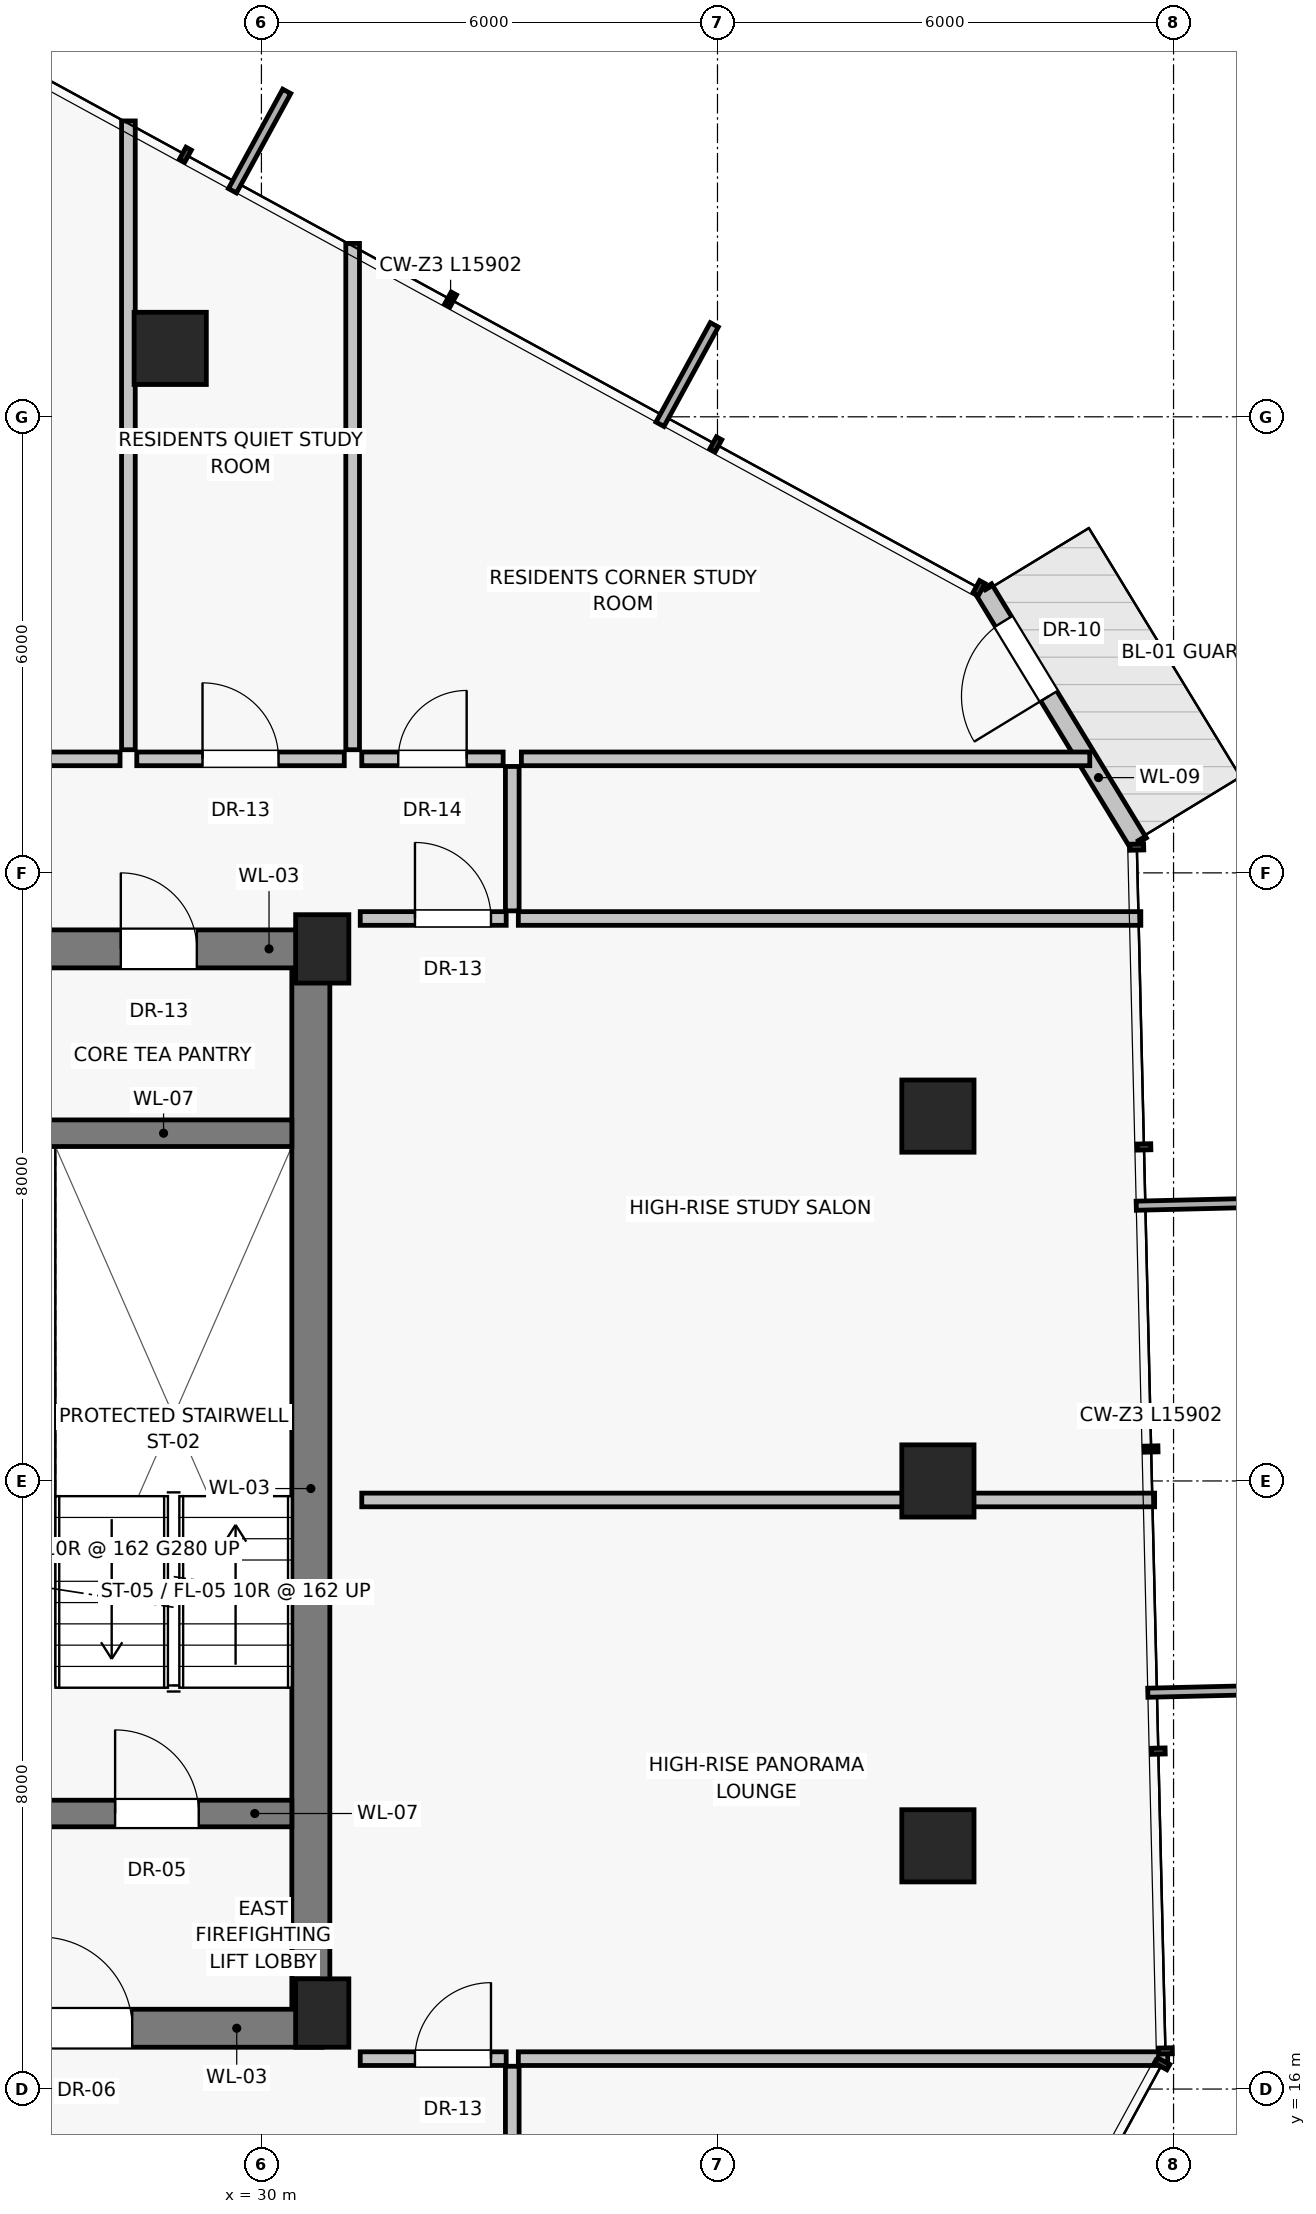
"""IFC4 building model, lengths in metres.
Left out: names, types, materials, properties, quantities, classifications, styles, units other than length and angle.
Written with IfcOpenShell. Run it as: python <this file> out.ifc"""

import sys

from ifc_helpers import new_model, si_unit, direction, frame, frame_2d, origin, origin_2d, place, context, subcontext, project, spatial, rectangle, extrude, source, transform, mapped, element, fill, save


model = new_model("IFC4")
c1 = context("Model", 3, precision=1e-05, world=origin(), true_north=direction((0.0, 1.0)))
c2 = subcontext(c1, "Body", "Model", "MODEL_VIEW")
j1 = project(units=[si_unit("LENGTHUNIT", "METRE"), si_unit("PLANEANGLEUNIT", "RADIAN")], contexts=[c1])
p1 = place(None, origin())
s1 = spatial("IfcSite", under=j1, at=p1, CompositionType="ELEMENT")
p2 = place(p1, origin())
s2 = spatial("IfcBuilding", under=s1, at=p2, CompositionType="ELEMENT")
p3 = place(p2, frame((0.0, 0.0, 201.6)))
s3 = spatial("IfcBuildingStorey", under=s2, at=p3, CompositionType="ELEMENT", Elevation=201.6)
for number, where, z_axis, x_axis in (
    (1, (30.8, 17.0, 0.0), (0.0, 0.0, 1.0), (1.0, 0.0, 0.0)),
    (2, (30.8, 31.0, 0.0), (0.0, 0.0, 1.0), (1.0, 0.0, 0.0)),
):
    element("IfcColumn", number, at=place(p3, frame(where, z_axis=z_axis, x_axis=x_axis)), inside=s3, PredefinedType="PILASTER", context=c2, shape_type="SweptSolid", body=[
        extrude(rectangle(XDim=0.7, YDim=0.9, at=origin_2d()), origin(), (0.0, 0.0, 1.0), 3.25),
    ])
for number, where, z_axis, x_axis in (
    (3, (38.9, 19.2, 0.0), (0.0, 0.0, 1.0), (1.0, 0.0, 0.0)),
    (4, (38.9, 24.0, 0.0), (0.0, 0.0, 1.0), (1.0, 0.0, 0.0)),
    (5, (38.9, 28.8, 0.0), (0.0, 0.0, 1.0), (1.0, 0.0, 0.0)),
    (6, (28.8, 38.9, 0.0), (0.0, 0.0, 1.0), (1.0, 0.0, 0.0)),
):
    element("IfcColumn", number, at=place(p3, frame(where, z_axis=z_axis, x_axis=x_axis)), inside=s3, PredefinedType="COLUMN", context=c2, shape_type="SweptSolid", body=[
        extrude(rectangle(XDim=0.95, YDim=0.95, at=origin_2d()), origin(), (0.0, 0.0, 1.0), 3.25),
    ])
p4 = place(p3, frame((41.536, 32.395, 0.0), z_axis=(0.0, 0.0, 1.0), x_axis=(-0.520390069566, 0.8539286712, 0.0)))
e7 = element("IfcWall", 7, at=p4, inside=s3, PredefinedType="SOLIDWALL", context=c2, shape_type="SweptSolid", body=[
    extrude(rectangle(XDim=3.915, YDim=0.25, at=frame_2d((1.957, 0.0))), origin(), (0.0, 0.0, 1.0), 3.015),
])
p5 = place(p4, frame((2.26, 0.0, 0.0)))
e8 = element("IfcOpeningElement", 8, at=p5, cuts=e7, PredefinedType="OPENING", context=c2, shape_type="SweptSolid", body=[
    extrude(rectangle(XDim=1.15, YDim=2.25, at=frame_2d((0.575, 1.125))), frame((0.0, 0.135, 0.0), z_axis=(0.0, -1.0, 0.0), x_axis=(1.0, 0.0, 0.0)), (0.0, 0.0, 1.0), 0.27),
])
p6 = place(p3, frame((30.65, 16.8, 0.0), z_axis=(0.0, 0.0, 1.0), x_axis=(0.0, 1.0, 0.0)))
e9 = element("IfcWall", 9, at=p6, inside=s3, PredefinedType="SHEAR", context=c2, shape_type="SweptSolid", body=[
    extrude(rectangle(XDim=14.2, YDim=0.5, at=frame_2d((7.1, 0.0))), origin(), (0.0, 0.0, 1.0), 3.015),
])
p7 = place(p3, frame((24.95, 16.8, 0.0), z_axis=(0.0, 0.0, 1.0), x_axis=(1.0, 0.0, 0.0)))
e10 = element("IfcWall", 10, at=p7, inside=s3, PredefinedType="SHEAR", context=c2, shape_type="SweptSolid", body=[
    extrude(rectangle(XDim=5.85, YDim=0.5, at=frame_2d((2.925, 0.0))), origin(), (0.0, 0.0, 1.0), 3.015),
])
p8 = place(p7, frame((2.15, 0.0, 0.0)))
e11 = element("IfcOpeningElement", 11, at=p8, cuts=e10, PredefinedType="OPENING", context=c2, shape_type="SweptSolid", body=[
    extrude(rectangle(XDim=1.2, YDim=2.03, at=frame_2d((0.6, 1.015))), frame((0.0, 0.26, 0.0), z_axis=(0.0, -1.0, 0.0), x_axis=(1.0, 0.0, 0.0)), (0.0, 0.0, 1.0), 0.52),
])
p9 = place(p3, frame((27.0, 31.0, 0.0), z_axis=(0.0, 0.0, 1.0), x_axis=(1.0, 0.0, 0.0)))
e12 = element("IfcWall", 12, at=p9, inside=s3, PredefinedType="SHEAR", context=c2, shape_type="SweptSolid", body=[
    extrude(rectangle(XDim=3.8, YDim=0.5, at=frame_2d((1.9, 0.0))), origin(), (0.0, 0.0, 1.0), 3.015),
])
p10 = place(p9, frame((1.15, 0.0, 0.0)))
e13 = element("IfcOpeningElement", 13, at=p10, cuts=e12, PredefinedType="OPENING", context=c2, shape_type="SweptSolid", body=[
    extrude(rectangle(XDim=1.0, YDim=2.01, at=frame_2d((0.5, 1.005))), frame((0.0, 0.26, 0.0), z_axis=(0.0, -1.0, 0.0), x_axis=(1.0, 0.0, 0.0)), (0.0, 0.0, 1.0), 0.52),
])
p11 = place(p3, frame((27.025, 19.625, 0.0), z_axis=(0.0, 0.0, 1.0), x_axis=(1.0, 0.0, 0.0)))
e14 = element("IfcWall", 14, at=p11, inside=s3, PredefinedType="SHEAR", context=c2, shape_type="SweptSolid", body=[
    extrude(rectangle(XDim=3.375, YDim=0.35, at=frame_2d((1.688, 0.0))), origin(), (0.0, 0.0, 1.0), 3.015),
])
p12 = place(p11, frame((1.05, 0.0, 0.0)))
e15 = element("IfcOpeningElement", 15, at=p12, cuts=e14, PredefinedType="OPENING", context=c2, shape_type="SweptSolid", body=[
    extrude(rectangle(XDim=1.1, YDim=2.03, at=frame_2d((0.55, 1.015))), frame((0.0, 0.185, 0.0), z_axis=(0.0, -1.0, 0.0), x_axis=(1.0, 0.0, 0.0)), (0.0, 0.0, 1.0), 0.37),
])
p13 = place(p3, frame((27.025, 28.575, 0.0), z_axis=(0.0, 0.0, 1.0), x_axis=(1.0, 0.0, 0.0)))
e16 = element("IfcWall", 16, at=p13, inside=s3, PredefinedType="SHEAR", context=c2, shape_type="SweptSolid", body=[
    extrude(rectangle(XDim=3.375, YDim=0.35, at=frame_2d((1.688, 0.0))), origin(), (0.0, 0.0, 1.0), 3.015),
])
p14 = place(p3, frame((31.2, 33.62, 0.0), z_axis=(0.0, 0.0, 1.0), x_axis=(0.0, 1.0, 0.0)))
e17 = element("IfcWall", 17, at=p14, inside=s3, PredefinedType="PARTITIONING", context=c2, shape_type="SweptSolid", body=[
    extrude(rectangle(XDim=6.661, YDim=0.18, at=frame_2d((3.331, 0.0))), origin(), (0.0, 0.0, 1.0), 3.015),
])
p15 = place(p3, frame((28.36, 33.5, 0.0), z_axis=(0.0, 0.0, 1.0), x_axis=(1.0, 0.0, 0.0)))
e18 = element("IfcWall", 18, at=p15, inside=s3, PredefinedType="PARTITIONING", context=c2, shape_type="SweptSolid", body=[
    extrude(rectangle(XDim=2.73, YDim=0.18, at=frame_2d((1.365, 0.0))), origin(), (0.0, 0.0, 1.0), 3.015),
])
p16 = place(p15, frame((0.865, 0.0, 0.0)))
e19 = element("IfcOpeningElement", 19, at=p16, cuts=e18, PredefinedType="OPENING", context=c2, shape_type="SweptSolid", body=[
    extrude(rectangle(XDim=1.0, YDim=2.01, at=frame_2d((0.5, 1.005))), frame((0.0, 0.1, 0.0), z_axis=(0.0, -1.0, 0.0), x_axis=(1.0, 0.0, 0.0)), (0.0, 0.0, 1.0), 0.2),
])
p17 = place(p3, frame((28.25, 33.62, 0.0), z_axis=(0.0, 0.0, 1.0), x_axis=(0.0, 1.0, 0.0)))
e20 = element("IfcWall", 20, at=p17, inside=s3, PredefinedType="PARTITIONING", context=c2, shape_type="SweptSolid", body=[
    extrude(rectangle(XDim=8.272, YDim=0.18, at=frame_2d((4.136, 0.0))), origin(), (0.0, 0.0, 1.0), 2.469),
])
p18 = place(p3, frame((23.93, 33.5, 0.0), z_axis=(0.0, 0.0, 1.0), x_axis=(1.0, 0.0, 0.0)))
e21 = element("IfcWall", 21, at=p18, inside=s3, PredefinedType="PARTITIONING", context=c2, shape_type="SweptSolid", body=[
    extrude(rectangle(XDim=4.21, YDim=0.18, at=frame_2d((2.105, 0.0))), origin(), (0.0, 0.0, 1.0), 3.015),
])
p19 = place(p18, frame((2.316, 0.0, 0.0)))
e22 = element("IfcOpeningElement", 22, at=p19, cuts=e21, PredefinedType="OPENING", context=c2, shape_type="SweptSolid", body=[
    extrude(rectangle(XDim=0.95, YDim=2.02, at=frame_2d((0.475, 1.01))), frame((0.0, 0.1, 0.0), z_axis=(0.0, -1.0, 0.0), x_axis=(1.0, 0.0, 0.0)), (0.0, 0.0, 1.0), 0.2),
])
p20 = place(p3, frame((31.32, 23.75, 0.0), z_axis=(0.0, 0.0, 1.0), x_axis=(1.0, 0.0, 0.0)))
e23 = element("IfcWall", 23, at=p20, inside=s3, PredefinedType="PARTITIONING", context=c2, shape_type="SweptSolid", body=[
    extrude(rectangle(XDim=10.431, YDim=0.18, at=frame_2d((5.216, 0.0))), origin(), (0.0, 0.0, 1.0), 3.015),
])
p21 = place(p3, frame((33.3, 14.4, 0.0), z_axis=(0.0, 0.0, 1.0), x_axis=(0.0, 1.0, 0.0)))
e24 = element("IfcWall", 24, at=p21, inside=s3, PredefinedType="PARTITIONING", context=c2, shape_type="SweptSolid", body=[
    extrude(rectangle(XDim=1.9, YDim=0.18, at=frame_2d((0.95, 0.0))), origin(), (0.0, 0.0, 1.0), 3.015),
])
p22 = place(p3, frame((33.3, 31.5, 0.0), z_axis=(0.0, 0.0, 1.0), x_axis=(0.0, 1.0, 0.0)))
e25 = element("IfcWall", 25, at=p22, inside=s3, PredefinedType="PARTITIONING", context=c2, shape_type="SweptSolid", body=[
    extrude(rectangle(XDim=1.9, YDim=0.18, at=frame_2d((0.95, 0.0))), origin(), (0.0, 0.0, 1.0), 3.015),
])
p23 = place(p3, frame((31.3, 16.4, 0.0), z_axis=(0.0, 0.0, 1.0), x_axis=(1.0, 0.0, 0.0)))
e26 = element("IfcWall", 26, at=p23, inside=s3, PredefinedType="PARTITIONING", context=c2, shape_type="SweptSolid", body=[
    extrude(rectangle(XDim=1.92, YDim=0.18, at=frame_2d((0.96, 0.0))), origin(), (0.0, 0.0, 1.0), 3.015),
])
p24 = place(p23, frame((0.72, 0.0, 0.0)))
e27 = element("IfcOpeningElement", 27, at=p24, cuts=e26, PredefinedType="OPENING", context=c2, shape_type="SweptSolid", body=[
    extrude(rectangle(XDim=1.0, YDim=2.01, at=frame_2d((0.5, 1.005))), frame((0.0, 0.1, 0.0), z_axis=(0.0, -1.0, 0.0), x_axis=(1.0, 0.0, 0.0)), (0.0, 0.0, 1.0), 0.2),
])
p25 = place(p3, frame((33.38, 16.4, 0.0), z_axis=(0.0, 0.0, 1.0), x_axis=(1.0, 0.0, 0.0)))
e28 = element("IfcWall", 28, at=p25, inside=s3, PredefinedType="PARTITIONING", context=c2, shape_type="SweptSolid", body=[
    extrude(rectangle(XDim=8.543, YDim=0.18, at=frame_2d((4.271, 0.0))), origin(), (0.0, 0.0, 1.0), 3.015),
])
p26 = place(p3, frame((31.3, 31.4, 0.0), z_axis=(0.0, 0.0, 1.0), x_axis=(1.0, 0.0, 0.0)))
e29 = element("IfcWall", 29, at=p26, inside=s3, PredefinedType="PARTITIONING", context=c2, shape_type="SweptSolid", body=[
    extrude(rectangle(XDim=1.92, YDim=0.18, at=frame_2d((0.96, 0.0))), origin(), (0.0, 0.0, 1.0), 3.015),
])
p27 = place(p26, frame((0.72, 0.0, 0.0)))
e30 = element("IfcOpeningElement", 30, at=p27, cuts=e29, PredefinedType="OPENING", context=c2, shape_type="SweptSolid", body=[
    extrude(rectangle(XDim=1.0, YDim=2.01, at=frame_2d((0.5, 1.005))), frame((0.0, 0.1, 0.0), z_axis=(0.0, -1.0, 0.0), x_axis=(1.0, 0.0, 0.0)), (0.0, 0.0, 1.0), 0.2),
])
p28 = place(p3, frame((33.38, 31.4, 0.0), z_axis=(0.0, 0.0, 1.0), x_axis=(1.0, 0.0, 0.0)))
e31 = element("IfcWall", 31, at=p28, inside=s3, PredefinedType="PARTITIONING", context=c2, shape_type="SweptSolid", body=[
    extrude(rectangle(XDim=8.19, YDim=0.18, at=frame_2d((4.095, 0.0))), origin(), (0.0, 0.0, 1.0), 3.015),
])
p29 = place(p3, frame((33.42, 33.5, 0.0), z_axis=(0.0, 0.0, 1.0), x_axis=(1.0, 0.0, 0.0)))
e32 = element("IfcWall", 32, at=p29, inside=s3, PredefinedType="PARTITIONING", context=c2, shape_type="SweptSolid", body=[
    extrude(rectangle(XDim=7.478, YDim=0.18, at=frame_2d((3.739, 0.0))), origin(), (0.0, 0.0, 1.0), 3.015),
])
p30 = place(p3, frame((31.32, 33.5, 0.0), z_axis=(0.0, 0.0, 1.0), x_axis=(1.0, 0.0, 0.0)))
e33 = element("IfcWall", 33, at=p30, inside=s3, PredefinedType="PARTITIONING", context=c2, shape_type="SweptSolid", body=[
    extrude(rectangle(XDim=1.86, YDim=0.18, at=frame_2d((0.93, 0.0))), origin(), (0.0, 0.0, 1.0), 3.015),
])
p31 = place(p30, frame((0.48, 0.0, 0.0)))
e34 = element("IfcOpeningElement", 34, at=p31, cuts=e33, PredefinedType="OPENING", context=c2, shape_type="SweptSolid", body=[
    extrude(rectangle(XDim=0.9, YDim=2.01, at=frame_2d((0.45, 1.005))), frame((0.0, 0.1, 0.0), z_axis=(0.0, -1.0, 0.0), x_axis=(1.0, 0.0, 0.0)), (0.0, 0.0, 1.0), 0.2),
])
m1 = source(origin(), c2, "Body", "SweptSolid", [
    extrude(rectangle(XDim=1.15, YDim=2.25, at=frame_2d((0.575, 1.125))), frame((0.0, 0.025, 0.0), z_axis=(0.0, -1.0, 0.0), x_axis=(1.0, 0.0, 0.0)), (0.0, 0.0, 1.0), 0.05),
])
p32 = place(p5, frame((1.15, 0.0, 0.0), z_axis=(0.0, 0.0, 1.0), x_axis=(-1.0, 0.0, 0.0)))
e35 = element("IfcDoor", 35, at=p32, inside=s3, OperationType="SINGLE_SWING_LEFT", PredefinedType="DOOR", context=c2, shape_type="MappedRepresentation", body=[
    mapped(m1, transform((0.0, 0.0, 0.0), scale=1.0)),
])
fill(e8, e35)
m2 = source(origin(), c2, "Body", "SweptSolid", [
    extrude(rectangle(XDim=1.2, YDim=2.03, at=frame_2d((0.6, 1.015))), frame((0.0, 0.025, 0.0), z_axis=(0.0, -1.0, 0.0), x_axis=(1.0, 0.0, 0.0)), (0.0, 0.0, 1.0), 0.05),
])
p33 = place(p8, origin())
e36 = element("IfcDoor", 36, at=p33, inside=s3, OperationType="SINGLE_SWING_LEFT", PredefinedType="DOOR", context=c2, shape_type="MappedRepresentation", body=[
    mapped(m2, transform((0.0, 0.0, 0.0), scale=1.0)),
])
fill(e11, e36)
m3 = source(origin(), c2, "Body", "SweptSolid", [
    extrude(rectangle(XDim=1.0, YDim=2.01, at=frame_2d((0.5, 1.005))), frame((0.0, 0.025, 0.0), z_axis=(0.0, -1.0, 0.0), x_axis=(1.0, 0.0, 0.0)), (0.0, 0.0, 1.0), 0.05),
])
p34 = place(p10, origin())
e37 = element("IfcDoor", 37, at=p34, inside=s3, OperationType="SINGLE_SWING_LEFT", PredefinedType="DOOR", context=c2, shape_type="MappedRepresentation", body=[
    mapped(m3, transform((0.0, 0.0, 0.0), scale=1.0)),
])
fill(e13, e37)
m4 = source(origin(), c2, "Body", "SweptSolid", [
    extrude(rectangle(XDim=1.1, YDim=2.03, at=frame_2d((0.55, 1.015))), frame((0.0, 0.025, 0.0), z_axis=(0.0, -1.0, 0.0), x_axis=(1.0, 0.0, 0.0)), (0.0, 0.0, 1.0), 0.05),
])
p35 = place(p12, origin())
e38 = element("IfcDoor", 38, at=p35, inside=s3, OperationType="SINGLE_SWING_LEFT", PredefinedType="DOOR", context=c2, shape_type="MappedRepresentation", body=[
    mapped(m4, transform((0.0, 0.0, 0.0), scale=1.0)),
])
fill(e15, e38)
p36 = place(p16, origin())
e39 = element("IfcDoor", 39, at=p36, inside=s3, OperationType="SINGLE_SWING_LEFT", PredefinedType="DOOR", context=c2, shape_type="MappedRepresentation", body=[
    mapped(m3, transform((0.0, 0.0, 0.0), scale=1.0)),
])
fill(e19, e39)
p37 = place(p24, origin())
e40 = element("IfcDoor", 40, at=p37, inside=s3, OperationType="SINGLE_SWING_RIGHT", PredefinedType="DOOR", context=c2, shape_type="MappedRepresentation", body=[
    mapped(m3, transform((0.0, 0.0, 0.0), scale=1.0)),
])
fill(e27, e40)
p38 = place(p27, origin())
e41 = element("IfcDoor", 41, at=p38, inside=s3, OperationType="SINGLE_SWING_LEFT", PredefinedType="DOOR", context=c2, shape_type="MappedRepresentation", body=[
    mapped(m3, transform((0.0, 0.0, 0.0), scale=1.0)),
])
fill(e30, e41)
m5 = source(origin(), c2, "Body", "SweptSolid", [
    extrude(rectangle(XDim=0.9, YDim=2.01, at=frame_2d((0.45, 1.005))), frame((0.0, 0.025, 0.0), z_axis=(0.0, -1.0, 0.0), x_axis=(1.0, 0.0, 0.0)), (0.0, 0.0, 1.0), 0.05),
])
p39 = place(p31, origin())
e42 = element("IfcDoor", 42, at=p39, inside=s3, OperationType="SINGLE_SWING_RIGHT", PredefinedType="DOOR", context=c2, shape_type="MappedRepresentation", body=[
    mapped(m5, transform((0.0, 0.0, 0.0), scale=1.0)),
])
fill(e34, e42)
save(model, sys.argv[1])
